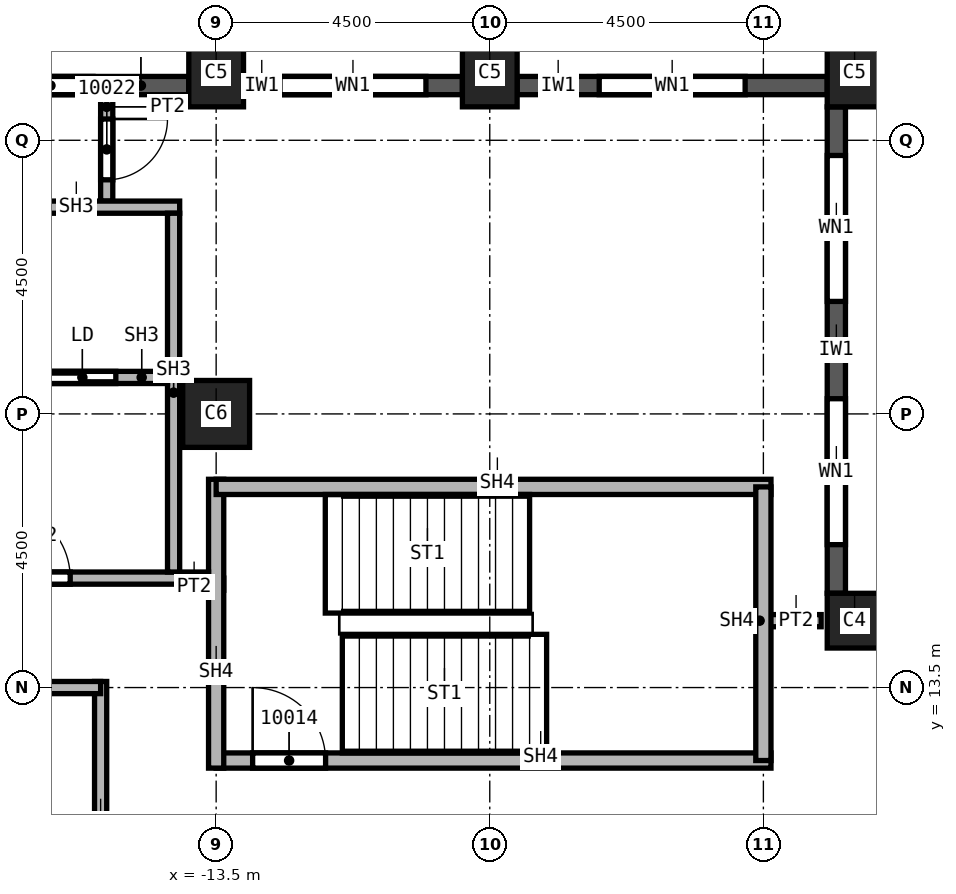
"""IFC4 building model, lengths in metres.
Left out: names, types, materials, properties, quantities, classifications, styles, units other than length and angle.
Written with IfcOpenShell. Run it as: python <this file> out.ifc"""

import sys

from ifc_helpers import new_model, si_unit, direction, frame, frame_2d, origin, origin_2d, place, context, subcontext, project, spatial, rectangle, extrude, element, fill, save


model = new_model("IFC4")
c1 = context("Model", 3, precision=1e-05, world=origin(), true_north=direction((0.0, 1.0)))
c2 = subcontext(c1, "Body", "Model", "MODEL_VIEW")
j1 = project(units=[si_unit("LENGTHUNIT", "METRE"), si_unit("PLANEANGLEUNIT", "RADIAN")], contexts=[c1])
p1 = place(None, origin())
s1 = spatial("IfcSite", under=j1, at=p1, CompositionType="ELEMENT")
p2 = place(p1, origin())
s2 = spatial("IfcBuilding", under=s1, at=p2, CompositionType="ELEMENT")
p3 = place(p2, frame((0.0, 0.0, 170.0)))
s3 = spatial("IfcBuildingStorey", under=s2, at=p3, CompositionType="ELEMENT", Elevation=170.0)
p4 = place(p3, frame((-13.5, 18.0, 0.0), z_axis=(0.0, 0.0, 1.0), x_axis=(1.0, 0.0, 0.0)))
e1 = element("IfcColumn", 1, at=p4, inside=s3, PredefinedType="COLUMN", context=c2, shape_type="SweptSolid", body=[
    extrude(rectangle(XDim=1.1, YDim=1.1, at=origin_2d()), origin(), (0.0, 0.0, 1.0), 3.7),
])
for number, where, z_axis, x_axis in (
    (2, (-3.0, 23.6, 0.0), (0.0, 0.0, 1.0), (1.0, 0.0, 0.0)),
    (3, (-9.0, 23.6, 0.0), (0.0, 0.0, 1.0), (1.0, 0.0, 0.0)),
    (4, (-13.5, 23.6, 0.0), (0.0, 0.0, 1.0), (1.0, 0.0, 0.0)),
):
    element("IfcColumn", number, at=place(p3, frame(where, z_axis=z_axis, x_axis=x_axis)), inside=s3, PredefinedType="COLUMN", context=c2, shape_type="SweptSolid", body=[
        extrude(rectangle(XDim=0.9, YDim=1.1, at=origin_2d()), origin(), (0.0, 0.0, 1.0), 3.7),
    ])
p5 = place(p3, frame((-3.0, 14.6, 0.0), z_axis=(0.0, 0.0, 1.0), x_axis=(1.0, 0.0, 0.0)))
e5 = element("IfcColumn", 5, at=p5, inside=s3, PredefinedType="COLUMN", context=c2, shape_type="SweptSolid", body=[
    extrude(rectangle(XDim=0.9, YDim=0.9, at=origin_2d()), origin(), (0.0, 0.0, 1.0), 3.7),
])
p6 = place(p3, frame((-3.3, 15.05, 0.0), z_axis=(0.0, 0.0, 1.0), x_axis=(0.0, 1.0, 0.0)))
e6 = element("IfcWall", 6, at=p6, inside=s3, PredefinedType="SOLIDWALL", context=c2, shape_type="SweptSolid", body=[
    extrude(rectangle(XDim=8.0, YDim=0.3, at=frame_2d((4.0, 0.0))), origin(), (0.0, 0.0, 1.0), 3.1),
])
p7 = place(p6, frame((0.8, 0.0, 0.8)))
e7 = element("IfcOpeningElement", 7, at=p7, cuts=e6, PredefinedType="OPENING", context=c2, shape_type="SweptSolid", body=[
    extrude(rectangle(XDim=2.4, YDim=1.95, at=frame_2d((1.2, 0.975))), frame((0.0, 0.15, 0.0), z_axis=(0.0, -1.0, 0.0), x_axis=(1.0, 0.0, 0.0)), (0.0, 0.0, 1.0), 0.3),
])
p8 = place(p6, frame((4.8, 0.0, 0.8)))
e8 = element("IfcOpeningElement", 8, at=p8, cuts=e6, PredefinedType="OPENING", context=c2, shape_type="SweptSolid", body=[
    extrude(rectangle(XDim=2.4, YDim=1.95, at=frame_2d((1.2, 0.975))), frame((0.0, 0.15, 0.0), z_axis=(0.0, -1.0, 0.0), x_axis=(1.0, 0.0, 0.0)), (0.0, 0.0, 1.0), 0.3),
])
p9 = place(p3, frame((-3.45, 23.4, 0.0), z_axis=(0.0, 0.0, 1.0), x_axis=(-1.0, 0.0, 0.0)))
e9 = element("IfcWall", 9, at=p9, inside=s3, PredefinedType="SOLIDWALL", context=c2, shape_type="SweptSolid", body=[
    extrude(rectangle(XDim=5.1, YDim=0.3, at=frame_2d((2.55, 0.0))), origin(), (0.0, 0.0, 1.0), 3.1),
])
p10 = place(p9, frame((1.35, 0.0, 0.8)))
e10 = element("IfcOpeningElement", 10, at=p10, cuts=e9, PredefinedType="OPENING", context=c2, shape_type="SweptSolid", body=[
    extrude(rectangle(XDim=2.4, YDim=1.95, at=frame_2d((1.2, 0.975))), frame((0.0, 0.15, 0.0), z_axis=(0.0, -1.0, 0.0), x_axis=(1.0, 0.0, 0.0)), (0.0, 0.0, 1.0), 0.3),
])
p11 = place(p3, frame((-9.45, 23.4, 0.0), z_axis=(0.0, 0.0, 1.0), x_axis=(-1.0, 0.0, 0.0)))
e11 = element("IfcWall", 11, at=p11, inside=s3, PredefinedType="SOLIDWALL", context=c2, shape_type="SweptSolid", body=[
    extrude(rectangle(XDim=3.6, YDim=0.3, at=frame_2d((1.8, 0.0))), origin(), (0.0, 0.0, 1.0), 3.1),
])
p12 = place(p11, frame((0.6, 0.0, 0.8)))
e12 = element("IfcOpeningElement", 12, at=p12, cuts=e11, PredefinedType="OPENING", context=c2, shape_type="SweptSolid", body=[
    extrude(rectangle(XDim=2.4, YDim=1.95, at=frame_2d((1.2, 0.975))), frame((0.0, 0.15, 0.0), z_axis=(0.0, -1.0, 0.0), x_axis=(1.0, 0.0, 0.0)), (0.0, 0.0, 1.0), 0.3),
])
p13 = place(p3, frame((-13.95, 23.4, 0.0), z_axis=(0.0, 0.0, 1.0), x_axis=(-1.0, 0.0, 0.0)))
e13 = element("IfcWall", 13, at=p13, inside=s3, PredefinedType="SOLIDWALL", context=c2, shape_type="SweptSolid", body=[
    extrude(rectangle(XDim=3.6, YDim=0.3, at=frame_2d((1.8, 0.0))), origin(), (0.0, 0.0, 1.0), 3.1),
])
p14 = place(p13, frame((1.575, 0.0, 0.8)))
e14 = element("IfcOpeningElement", 14, at=p14, cuts=e13, PredefinedType="OPENING", context=c2, shape_type="SweptSolid", body=[
    extrude(rectangle(XDim=1.4, YDim=1.95, at=frame_2d((0.7, 0.975))), frame((0.0, 0.15, 0.0), z_axis=(0.0, -1.0, 0.0), x_axis=(1.0, 0.0, 0.0)), (0.0, 0.0, 1.0), 0.3),
])
p15 = place(p3, frame((-15.4, 3.65, 0.0), z_axis=(0.0, 0.0, 1.0), x_axis=(0.0, 1.0, 0.0)))
e15 = element("IfcWall", 15, at=p15, inside=s3, PredefinedType="PARTITIONING", context=c2, shape_type="SweptSolid", body=[
    extrude(rectangle(XDim=9.95, YDim=0.2, at=frame_2d((4.975, 0.0))), origin(), (0.0, 0.0, 1.0), 3.7),
])
p16 = place(p15, frame((0.4, 0.0, 0.0)))
e16 = element("IfcOpeningElement", 16, at=p16, cuts=e15, PredefinedType="OPENING", context=c2, shape_type="SweptSolid", body=[
    extrude(rectangle(XDim=1.0, YDim=2.1, at=frame_2d((0.5, 1.05))), frame((0.0, 0.1, 0.0), z_axis=(0.0, -1.0, 0.0), x_axis=(1.0, 0.0, 0.0)), (0.0, 0.0, 1.0), 0.2),
])
p17 = place(p3, frame((-15.4, 13.5, 0.0), z_axis=(0.0, 0.0, 1.0), x_axis=(-1.0, 0.0, 0.0)))
e17 = element("IfcWall", 17, at=p17, inside=s3, PredefinedType="PARTITIONING", context=c2, shape_type="SweptSolid", body=[
    extrude(rectangle(XDim=6.6, YDim=0.2, at=frame_2d((3.3, 0.0))), origin(), (0.0, 0.0, 1.0), 3.7),
])
p18 = place(p17, frame((5.35, 0.0, 0.0)))
e18 = element("IfcOpeningElement", 18, at=p18, cuts=e17, PredefinedType="OPENING", context=c2, shape_type="SweptSolid", body=[
    extrude(rectangle(XDim=1.0, YDim=2.1, at=frame_2d((0.5, 1.05))), frame((0.0, 0.1, 0.0), z_axis=(0.0, -1.0, 0.0), x_axis=(1.0, 0.0, 0.0)), (0.0, 0.0, 1.0), 0.2),
])
p19 = place(p3, frame((-15.3, 23.25, 0.0), z_axis=(0.0, 0.0, 1.0), x_axis=(0.0, -1.0, 0.0)))
e19 = element("IfcWall", 19, at=p19, inside=s3, PredefinedType="PARTITIONING", context=c2, shape_type="SweptSolid", body=[
    extrude(rectangle(XDim=1.75, YDim=0.2, at=frame_2d((0.875, 0.0))), origin(), (0.0, 0.0, 1.0), 3.7),
])
p20 = place(p19, frame((0.4, 0.0, 0.0)))
e20 = element("IfcOpeningElement", 20, at=p20, cuts=e19, PredefinedType="OPENING", context=c2, shape_type="SweptSolid", body=[
    extrude(rectangle(XDim=1.0, YDim=2.1, at=frame_2d((0.5, 1.05))), frame((0.0, 0.1, 0.0), z_axis=(0.0, -1.0, 0.0), x_axis=(1.0, 0.0, 0.0)), (0.0, 0.0, 1.0), 0.2),
])
p21 = place(p3, frame((-14.1, 15.2, 0.0), z_axis=(0.0, 0.0, 1.0), x_axis=(1.0, 0.0, 0.0)))
e21 = element("IfcWall", 21, at=p21, inside=s3, PredefinedType="PARTITIONING", context=c2, shape_type="SweptSolid", body=[
    extrude(rectangle(XDim=0.725, YDim=0.2, at=frame_2d((0.363, 0.0))), origin(), (0.0, 0.0, 1.0), 3.7),
])
p22 = place(p3, frame((-4.5, 14.6, 0.0), z_axis=(0.0, 0.0, 1.0), x_axis=(1.0, 0.0, 0.0)))
e22 = element("IfcWall", 22, at=p22, inside=s3, PredefinedType="PARTITIONING", context=c2, shape_type="SweptSolid", body=[
    extrude(rectangle(XDim=0.95, YDim=0.2, at=frame_2d((0.475, 0.0))), origin(), (0.0, 0.0, 1.0), 3.7),
])
p23 = place(p3, frame((-13.5, 12.3, 0.0), z_axis=(0.0, 0.0, 1.0), x_axis=(1.0, 0.0, 0.0)))
e23 = element("IfcWall", 23, at=p23, inside=s3, PredefinedType="SOLIDWALL", context=c2, shape_type="SweptSolid", body=[
    extrude(rectangle(XDim=9.125, YDim=0.25, at=frame_2d((4.562, 0.0))), origin(), (0.0, 0.0, 1.0), 3.7),
])
p24 = place(p23, frame((0.6, 0.0, 0.0)))
e24 = element("IfcOpeningElement", 24, at=p24, cuts=e23, PredefinedType="OPENING", context=c2, shape_type="SweptSolid", body=[
    extrude(rectangle(XDim=1.2, YDim=2.1, at=frame_2d((0.6, 1.05))), frame((0.0, 0.125, 0.0), z_axis=(0.0, -1.0, 0.0), x_axis=(1.0, 0.0, 0.0)), (0.0, 0.0, 1.0), 0.25),
])
p25 = place(p3, frame((-13.5, 12.175, 0.0), z_axis=(0.0, 0.0, 1.0), x_axis=(0.0, 1.0, 0.0)))
e25 = element("IfcWall", 25, at=p25, inside=s3, PredefinedType="SOLIDWALL", context=c2, shape_type="SweptSolid", body=[
    extrude(rectangle(XDim=4.75, YDim=0.25, at=frame_2d((2.375, 0.0))), origin(), (0.0, 0.0, 1.0), 3.7),
])
p26 = place(p3, frame((-13.5, 16.8, 0.0), z_axis=(0.0, 0.0, 1.0), x_axis=(1.0, 0.0, 0.0)))
e26 = element("IfcWall", 26, at=p26, inside=s3, PredefinedType="SOLIDWALL", context=c2, shape_type="SweptSolid", body=[
    extrude(rectangle(XDim=9.125, YDim=0.25, at=frame_2d((4.562, 0.0))), origin(), (0.0, 0.0, 1.0), 3.7),
])
p27 = place(p3, frame((-4.5, 16.8, 0.0), z_axis=(0.0, 0.0, 1.0), x_axis=(0.0, -1.0, 0.0)))
e27 = element("IfcWall", 27, at=p27, inside=s3, PredefinedType="SOLIDWALL", context=c2, shape_type="SweptSolid", body=[
    extrude(rectangle(XDim=4.5, YDim=0.25, at=frame_2d((2.25, 0.0))), origin(), (0.0, 0.0, 1.0), 3.7),
])
p28 = place(p3, frame((-21.9, 15.3, 0.0), z_axis=(0.0, 0.0, 1.0), x_axis=(1.0, 0.0, 0.0)))
e28 = element("IfcWall", 28, at=p28, inside=s3, PredefinedType="SOLIDWALL", context=c2, shape_type="SweptSolid", body=[
    extrude(rectangle(XDim=8.275, YDim=0.2, at=frame_2d((4.137, 0.0))), origin(), (0.0, 0.0, 1.0), 3.7),
])
p29 = place(p28, frame((4.8, 0.0, 0.0)))
e29 = element("IfcOpeningElement", 29, at=p29, cuts=e28, PredefinedType="OPENING", context=c2, shape_type="SweptSolid", body=[
    extrude(rectangle(XDim=1.2, YDim=2.1, at=frame_2d((0.6, 1.05))), frame((0.0, 0.1, 0.0), z_axis=(0.0, -1.0, 0.0), x_axis=(1.0, 0.0, 0.0)), (0.0, 0.0, 1.0), 0.2),
])
p30 = place(p3, frame((-21.9, 21.4, 0.0), z_axis=(0.0, 0.0, 1.0), x_axis=(1.0, 0.0, 0.0)))
e30 = element("IfcWall", 30, at=p30, inside=s3, PredefinedType="SOLIDWALL", context=c2, shape_type="SweptSolid", body=[
    extrude(rectangle(XDim=7.8, YDim=0.2, at=frame_2d((3.9, 0.0))), origin(), (0.0, 0.0, 1.0), 3.7),
])
p31 = place(p30, frame((3.2, 0.0, 0.0)))
e31 = element("IfcOpeningElement", 31, at=p31, cuts=e30, PredefinedType="OPENING", context=c2, shape_type="SweptSolid", body=[
    extrude(rectangle(XDim=1.2, YDim=2.1, at=frame_2d((0.6, 1.05))), frame((0.0, 0.1, 0.0), z_axis=(0.0, -1.0, 0.0), x_axis=(1.0, 0.0, 0.0)), (0.0, 0.0, 1.0), 0.2),
])
p32 = place(p3, frame((-14.2, 15.4, 0.0), z_axis=(0.0, 0.0, 1.0), x_axis=(0.0, 1.0, 0.0)))
e32 = element("IfcWall", 32, at=p32, inside=s3, PredefinedType="SOLIDWALL", context=c2, shape_type="SweptSolid", body=[
    extrude(rectangle(XDim=5.9, YDim=0.2, at=frame_2d((2.95, 0.0))), origin(), (0.0, 0.0, 1.0), 3.7),
])
p33 = place(p3, frame((-17.1, 18.6, 0.0), z_axis=(0.0, 0.0, 1.0), x_axis=(1.0, 0.0, 0.0)))
e33 = element("IfcWall", 33, at=p33, inside=s3, PredefinedType="SOLIDWALL", context=c2, shape_type="SweptSolid", body=[
    extrude(rectangle(XDim=2.8, YDim=0.2, at=frame_2d((1.4, 0.0))), origin(), (0.0, 0.0, 1.0), 3.7),
])
p34 = place(p33, frame((0.85, 0.0, 0.0)))
e34 = element("IfcOpeningElement", 34, at=p34, cuts=e33, PredefinedType="OPENING", context=c2, shape_type="SweptSolid", body=[
    extrude(rectangle(XDim=1.1, YDim=2.1, at=frame_2d((0.55, 1.05))), frame((0.0, 0.1, 0.0), z_axis=(0.0, -1.0, 0.0), x_axis=(1.0, 0.0, 0.0)), (0.0, 0.0, 1.0), 0.2),
])
p35 = place(p7, origin())
e35 = element("IfcWindow", 35, at=p35, inside=s3, PartitioningType="SINGLE_PANEL", PredefinedType="WINDOW", context=c2, shape_type="SweptSolid", body=[
    extrude(rectangle(XDim=2.4, YDim=1.95, at=frame_2d((1.2, 0.975))), frame((0.0, 0.03, 0.0), z_axis=(0.0, -1.0, 0.0), x_axis=(1.0, 0.0, 0.0)), (0.0, 0.0, 1.0), 0.06),
])
fill(e7, e35)
p36 = place(p8, origin())
e36 = element("IfcWindow", 36, at=p36, inside=s3, PartitioningType="SINGLE_PANEL", PredefinedType="WINDOW", context=c2, shape_type="SweptSolid", body=[
    extrude(rectangle(XDim=2.4, YDim=1.95, at=frame_2d((1.2, 0.975))), frame((0.0, 0.03, 0.0), z_axis=(0.0, -1.0, 0.0), x_axis=(1.0, 0.0, 0.0)), (0.0, 0.0, 1.0), 0.06),
])
fill(e8, e36)
p37 = place(p10, origin())
e37 = element("IfcWindow", 37, at=p37, inside=s3, PartitioningType="SINGLE_PANEL", PredefinedType="WINDOW", context=c2, shape_type="SweptSolid", body=[
    extrude(rectangle(XDim=2.4, YDim=1.95, at=frame_2d((1.2, 0.975))), frame((0.0, 0.03, 0.0), z_axis=(0.0, -1.0, 0.0), x_axis=(1.0, 0.0, 0.0)), (0.0, 0.0, 1.0), 0.06),
])
fill(e10, e37)
p38 = place(p12, origin())
e38 = element("IfcWindow", 38, at=p38, inside=s3, PartitioningType="SINGLE_PANEL", PredefinedType="WINDOW", context=c2, shape_type="SweptSolid", body=[
    extrude(rectangle(XDim=2.4, YDim=1.95, at=frame_2d((1.2, 0.975))), frame((0.0, 0.03, 0.0), z_axis=(0.0, -1.0, 0.0), x_axis=(1.0, 0.0, 0.0)), (0.0, 0.0, 1.0), 0.06),
])
fill(e12, e38)
p39 = place(p24, origin())
e39 = element("IfcDoor", 39, at=p39, inside=s3, OperationType="SINGLE_SWING_LEFT", PredefinedType="DOOR", context=c2, shape_type="SweptSolid", body=[
    extrude(rectangle(XDim=1.2, YDim=2.1, at=frame_2d((0.6, 1.05))), frame((0.0, 0.025, 0.0), z_axis=(0.0, -1.0, 0.0), x_axis=(1.0, 0.0, 0.0)), (0.0, 0.0, 1.0), 0.05),
])
fill(e24, e39)
p40 = place(p20, origin())
e40 = element("IfcDoor", 40, at=p40, inside=s3, OperationType="SINGLE_SWING_LEFT", PredefinedType="DOOR", context=c2, shape_type="SweptSolid", body=[
    extrude(rectangle(XDim=1.0, YDim=2.1, at=frame_2d((0.5, 1.05))), frame((0.0, 0.025, 0.0), z_axis=(0.0, -1.0, 0.0), x_axis=(1.0, 0.0, 0.0)), (0.0, 0.0, 1.0), 0.05),
])
fill(e20, e40)
p41 = place(p34, origin())
e41 = element("IfcDoor", 41, at=p41, inside=s3, OperationType="SLIDING_TO_LEFT", PredefinedType="DOOR", context=c2, shape_type="SweptSolid", body=[
    extrude(rectangle(XDim=1.1, YDim=2.1, at=frame_2d((0.55, 1.05))), frame((0.0, 0.025, 0.0), z_axis=(0.0, -1.0, 0.0), x_axis=(1.0, 0.0, 0.0)), (0.0, 0.0, 1.0), 0.05),
])
fill(e34, e41)
p42 = place(p29, origin())
e42 = element("IfcDoor", 42, at=p42, inside=s3, OperationType="SINGLE_SWING_RIGHT", PredefinedType="DOOR", context=c2, shape_type="SweptSolid", body=[
    extrude(rectangle(XDim=1.2, YDim=2.1, at=frame_2d((0.6, 1.05))), frame((0.0, 0.025, 0.0), z_axis=(0.0, -1.0, 0.0), x_axis=(1.0, 0.0, 0.0)), (0.0, 0.0, 1.0), 0.05),
])
fill(e29, e42)
p43 = place(p14, origin())
e43 = element("IfcWindow", 43, at=p43, inside=s3, PartitioningType="SINGLE_PANEL", PredefinedType="WINDOW", context=c2, shape_type="SweptSolid", body=[
    extrude(rectangle(XDim=1.4, YDim=1.95, at=frame_2d((0.7, 0.975))), frame((0.0, 0.03, 0.0), z_axis=(0.0, -1.0, 0.0), x_axis=(1.0, 0.0, 0.0)), (0.0, 0.0, 1.0), 0.06),
])
fill(e14, e43)
save(model, sys.argv[1])
